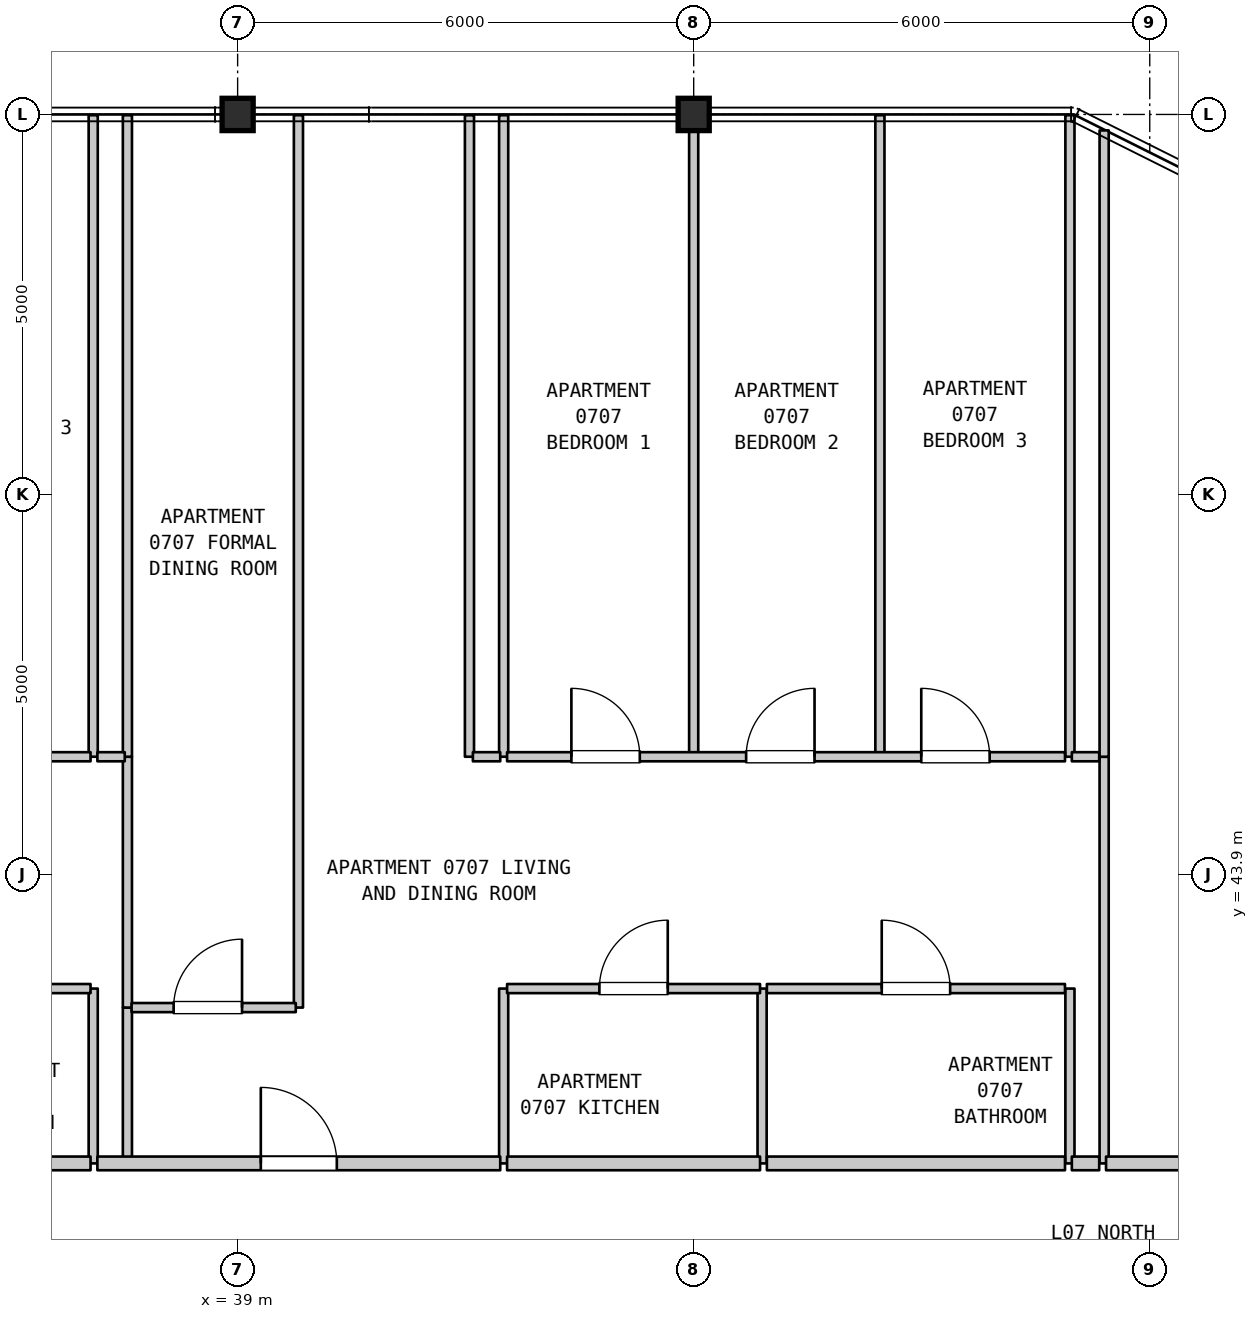
"""IFC4 building model, lengths in metres.
Left out: names, types, materials, properties, quantities, classifications, styles, units other than length and angle.
Written with IfcOpenShell. Run it as: python <this file> out.ifc"""

import sys

from ifc_helpers import new_model, si_unit, direction, frame, frame_2d, origin, origin_2d, place, context, subcontext, project, spatial, rectangle, i_section, extrude, element, fill, save


model = new_model("IFC4")
c1 = context("Model", 3, precision=1e-05, world=origin(), true_north=direction((0.0, 1.0)))
c2 = subcontext(c1, "Body", "Model", "MODEL_VIEW")
j1 = project(units=[si_unit("LENGTHUNIT", "METRE"), si_unit("PLANEANGLEUNIT", "RADIAN")], contexts=[c1])
p1 = place(None, origin())
s1 = spatial("IfcSite", under=j1, at=p1, CompositionType="ELEMENT")
p2 = place(p1, origin())
s2 = spatial("IfcBuilding", under=s1, at=p2, CompositionType="ELEMENT")
p3 = place(p2, frame((0.0, 0.0, 35.1)))
s3 = spatial("IfcBuildingStorey", under=s2, at=p3, CompositionType="ELEMENT", Elevation=35.1)
for number, where, z_axis, x_axis in (
    (1, (39.0, 53.9, 0.0), (0.0, 0.0, 1.0), (1.0, 0.0, 0.0)),
    (2, (45.0, 53.9, 0.0), (0.0, 0.0, 1.0), (1.0, 0.0, 0.0)),
):
    element("IfcColumn", number, at=place(p3, frame(where, z_axis=z_axis, x_axis=x_axis)), inside=s3, PredefinedType="COLUMN", context=c2, shape_type="SweptSolid", body=[
        extrude(i_section(OverallWidth=0.409, OverallDepth=0.425, WebThickness=0.032, FlangeThickness=0.052, FilletRadius=0.015, at=origin_2d()), origin(), (0.0, 0.0, 1.0), 3.7),
    ])
p4 = place(p3, frame((37.1, 40.1, 0.0), z_axis=(0.0, 0.0, 1.0), x_axis=(0.0, 1.0, 0.0)))
e3 = element("IfcWall", 3, at=p4, inside=s3, PredefinedType="PARTITIONING", context=c2, shape_type="SweptSolid", body=[
    extrude(rectangle(XDim=2.3, YDim=0.12, at=frame_2d((1.15, 0.0))), origin(), (0.0, 0.0, 1.0), 3.385),
])
p5 = place(p3, frame((37.1, 45.45, 0.0), z_axis=(0.0, 0.0, 1.0), x_axis=(0.0, 1.0, 0.0)))
e4 = element("IfcWall", 4, at=p5, inside=s3, PredefinedType="PARTITIONING", context=c2, shape_type="SweptSolid", body=[
    extrude(rectangle(XDim=8.44, YDim=0.12, at=frame_2d((4.22, 0.0))), origin(), (0.0, 0.0, 1.0), 3.385),
])
p6 = place(p3, frame((37.55, 40.1, 0.0), z_axis=(0.0, 0.0, 1.0), x_axis=(0.0, 1.0, 0.0)))
e5 = element("IfcWall", 5, at=p6, inside=s3, PredefinedType="PARTITIONING", context=c2, shape_type="SweptSolid", body=[
    extrude(rectangle(XDim=2.05, YDim=0.12, at=frame_2d((1.025, 0.0))), origin(), (0.0, 0.0, 1.0), 3.385),
])
p7 = place(p3, frame((37.55, 42.15, 0.0), z_axis=(0.0, 0.0, 1.0), x_axis=(0.0, 1.0, 0.0)))
e6 = element("IfcWall", 6, at=p7, inside=s3, PredefinedType="PARTITIONING", context=c2, shape_type="SweptSolid", body=[
    extrude(rectangle(XDim=3.3, YDim=0.12, at=frame_2d((1.65, 0.0))), origin(), (0.0, 0.0, 1.0), 3.385),
])
p8 = place(p3, frame((37.55, 45.45, 0.0), z_axis=(0.0, 0.0, 1.0), x_axis=(0.0, 1.0, 0.0)))
e7 = element("IfcWall", 7, at=p8, inside=s3, PredefinedType="PARTITIONING", context=c2, shape_type="SweptSolid", body=[
    extrude(rectangle(XDim=8.44, YDim=0.12, at=frame_2d((4.22, 0.0))), origin(), (0.0, 0.0, 1.0), 3.385),
])
p9 = place(p3, frame((39.8, 42.15, 0.0), z_axis=(0.0, 0.0, 1.0), x_axis=(0.0, 1.0, 0.0)))
e8 = element("IfcWall", 8, at=p9, inside=s3, PredefinedType="PARTITIONING", context=c2, shape_type="SweptSolid", body=[
    extrude(rectangle(XDim=11.74, YDim=0.12, at=frame_2d((5.87, 0.0))), origin(), (0.0, 0.0, 1.0), 3.385),
])
p10 = place(p3, frame((42.05, 45.45, 0.0), z_axis=(0.0, 0.0, 1.0), x_axis=(0.0, 1.0, 0.0)))
e9 = element("IfcWall", 9, at=p10, inside=s3, PredefinedType="PARTITIONING", context=c2, shape_type="SweptSolid", body=[
    extrude(rectangle(XDim=8.44, YDim=0.12, at=frame_2d((4.22, 0.0))), origin(), (0.0, 0.0, 1.0), 3.385),
])
p11 = place(p3, frame((42.5, 40.1, 0.0), z_axis=(0.0, 0.0, 1.0), x_axis=(0.0, 1.0, 0.0)))
e10 = element("IfcWall", 10, at=p11, inside=s3, PredefinedType="PARTITIONING", context=c2, shape_type="SweptSolid", body=[
    extrude(rectangle(XDim=2.3, YDim=0.12, at=frame_2d((1.15, 0.0))), origin(), (0.0, 0.0, 1.0), 3.385),
])
for number, where, z_axis, x_axis in (
    (11, (42.5, 45.45, 0.0), (0.0, 0.0, 1.0), (0.0, 1.0, 0.0)),
    (12, (45.0, 45.45, 0.0), (0.0, 0.0, 1.0), (0.0, 1.0, 0.0)),
):
    element("IfcWall", number, at=place(p3, frame(where, z_axis=z_axis, x_axis=x_axis)), inside=s3, PredefinedType="PARTITIONING", context=c2, shape_type="SweptSolid", body=[
        extrude(rectangle(XDim=8.44, YDim=0.12, at=frame_2d((4.22, 0.0))), origin(), (0.0, 0.0, 1.0), 3.385),
    ])
p12 = place(p3, frame((45.9, 40.1, 0.0), z_axis=(0.0, 0.0, 1.0), x_axis=(0.0, 1.0, 0.0)))
e13 = element("IfcWall", 13, at=p12, inside=s3, PredefinedType="PARTITIONING", context=c2, shape_type="SweptSolid", body=[
    extrude(rectangle(XDim=2.3, YDim=0.12, at=frame_2d((1.15, 0.0))), origin(), (0.0, 0.0, 1.0), 3.385),
])
p13 = place(p3, frame((47.45, 45.45, 0.0), z_axis=(0.0, 0.0, 1.0), x_axis=(0.0, 1.0, 0.0)))
e14 = element("IfcWall", 14, at=p13, inside=s3, PredefinedType="PARTITIONING", context=c2, shape_type="SweptSolid", body=[
    extrude(rectangle(XDim=8.44, YDim=0.12, at=frame_2d((4.22, 0.0))), origin(), (0.0, 0.0, 1.0), 3.385),
])
p14 = place(p3, frame((49.95, 40.1, 0.0), z_axis=(0.0, 0.0, 1.0), x_axis=(0.0, 1.0, 0.0)))
e15 = element("IfcWall", 15, at=p14, inside=s3, PredefinedType="PARTITIONING", context=c2, shape_type="SweptSolid", body=[
    extrude(rectangle(XDim=2.3, YDim=0.12, at=frame_2d((1.15, 0.0))), origin(), (0.0, 0.0, 1.0), 3.385),
])
p15 = place(p3, frame((49.95, 45.45, 0.0), z_axis=(0.0, 0.0, 1.0), x_axis=(0.0, 1.0, 0.0)))
e16 = element("IfcWall", 16, at=p15, inside=s3, PredefinedType="PARTITIONING", context=c2, shape_type="SweptSolid", body=[
    extrude(rectangle(XDim=8.44, YDim=0.12, at=frame_2d((4.22, 0.0))), origin(), (0.0, 0.0, 1.0), 3.385),
])
p16 = place(p3, frame((50.4, 40.1, 0.0), z_axis=(0.0, 0.0, 1.0), x_axis=(0.0, 1.0, 0.0)))
e17 = element("IfcWall", 17, at=p16, inside=s3, PredefinedType="PARTITIONING", context=c2, shape_type="SweptSolid", body=[
    extrude(rectangle(XDim=5.35, YDim=0.12, at=frame_2d((2.675, 0.0))), origin(), (0.0, 0.0, 1.0), 3.385),
])
p17 = place(p3, frame((50.4, 45.45, 0.0), z_axis=(0.0, 0.0, 1.0), x_axis=(0.0, 1.0, 0.0)))
e18 = element("IfcWall", 18, at=p17, inside=s3, PredefinedType="PARTITIONING", context=c2, shape_type="SweptSolid", body=[
    extrude(rectangle(XDim=8.24, YDim=0.12, at=frame_2d((4.12, 0.0))), origin(), (0.0, 0.0, 1.0), 3.385),
])
p18 = place(p3, frame((34.873, 40.1, 0.0), z_axis=(0.0, 0.0, 1.0), x_axis=(1.0, 0.0, 0.0)))
e19 = element("IfcWall", 19, at=p18, inside=s3, PredefinedType="STANDARD", context=c2, shape_type="SweptSolid", body=[
    extrude(rectangle(XDim=2.192, YDim=0.18, at=frame_2d((1.096, 0.0))), origin(), (0.0, 0.0, 1.0), 3.385),
])
p19 = place(p3, frame((37.155, 40.1, 0.0), z_axis=(0.0, 0.0, 1.0), x_axis=(1.0, 0.0, 0.0)))
e20 = element("IfcWall", 20, at=p19, inside=s3, PredefinedType="STANDARD", context=c2, shape_type="SweptSolid", body=[
    extrude(rectangle(XDim=5.3, YDim=0.18, at=frame_2d((2.65, 0.0))), origin(), (0.0, 0.0, 1.0), 3.385),
])
p20 = place(p19, frame((2.15, 0.0, 0.0)))
e21 = element("IfcOpeningElement", 21, at=p20, cuts=e20, PredefinedType="OPENING", context=c2, shape_type="SweptSolid", body=[
    extrude(rectangle(XDim=1.0, YDim=2.15, at=frame_2d((0.5, 1.075))), frame((0.0, 0.1, 0.0), z_axis=(0.0, -1.0, 0.0), x_axis=(1.0, 0.0, 0.0)), (0.0, 0.0, 1.0), 0.2),
])
p21 = place(p3, frame((42.545, 40.1, 0.0), z_axis=(0.0, 0.0, 1.0), x_axis=(1.0, 0.0, 0.0)))
e22 = element("IfcWall", 22, at=p21, inside=s3, PredefinedType="STANDARD", context=c2, shape_type="SweptSolid", body=[
    extrude(rectangle(XDim=3.328, YDim=0.18, at=frame_2d((1.664, 0.0))), origin(), (0.0, 0.0, 1.0), 3.385),
])
p22 = place(p3, frame((45.963, 40.1, 0.0), z_axis=(0.0, 0.0, 1.0), x_axis=(1.0, 0.0, 0.0)))
e23 = element("IfcWall", 23, at=p22, inside=s3, PredefinedType="STANDARD", context=c2, shape_type="SweptSolid", body=[
    extrude(rectangle(XDim=3.922, YDim=0.18, at=frame_2d((1.961, 0.0))), origin(), (0.0, 0.0, 1.0), 3.385),
])
p23 = place(p3, frame((49.975, 40.1, 0.0), z_axis=(0.0, 0.0, 1.0), x_axis=(1.0, 0.0, 0.0)))
e24 = element("IfcWall", 24, at=p23, inside=s3, PredefinedType="STANDARD", context=c2, shape_type="SweptSolid", body=[
    extrude(rectangle(XDim=0.36, YDim=0.18, at=frame_2d((0.18, 0.0))), origin(), (0.0, 0.0, 1.0), 3.385),
])
p24 = place(p3, frame((50.425, 40.1, 0.0), z_axis=(0.0, 0.0, 1.0), x_axis=(1.0, 0.0, 0.0)))
e25 = element("IfcWall", 25, at=p24, inside=s3, PredefinedType="STANDARD", context=c2, shape_type="SweptSolid", body=[
    extrude(rectangle(XDim=4.03, YDim=0.18, at=frame_2d((2.015, 0.0))), origin(), (0.0, 0.0, 1.0), 3.385),
])
p25 = place(p24, frame((1.515, 0.0, 0.0)))
e26 = element("IfcOpeningElement", 26, at=p25, cuts=e25, PredefinedType="OPENING", context=c2, shape_type="SweptSolid", body=[
    extrude(rectangle(XDim=1.0, YDim=2.15, at=frame_2d((0.5, 1.075))), frame((0.0, 0.1, 0.0), z_axis=(0.0, -1.0, 0.0), x_axis=(1.0, 0.0, 0.0)), (0.0, 0.0, 1.0), 0.2),
])
p26 = place(p3, frame((37.605, 42.15, 0.0), z_axis=(0.0, 0.0, 1.0), x_axis=(1.0, 0.0, 0.0)))
e27 = element("IfcWall", 27, at=p26, inside=s3, PredefinedType="PARTITIONING", context=c2, shape_type="SweptSolid", body=[
    extrude(rectangle(XDim=2.16, YDim=0.12, at=frame_2d((1.08, 0.0))), origin(), (0.0, 0.0, 1.0), 3.385),
])
p27 = place(p26, frame((0.553, 0.0, 0.0)))
e28 = element("IfcOpeningElement", 28, at=p27, cuts=e27, PredefinedType="OPENING", context=c2, shape_type="SweptSolid", body=[
    extrude(rectangle(XDim=0.9, YDim=2.15, at=frame_2d((0.45, 1.075))), frame((0.0, 0.07, 0.0), z_axis=(0.0, -1.0, 0.0), x_axis=(1.0, 0.0, 0.0)), (0.0, 0.0, 1.0), 0.14),
])
p28 = place(p3, frame((34.873, 42.4, 0.0), z_axis=(0.0, 0.0, 1.0), x_axis=(1.0, 0.0, 0.0)))
e29 = element("IfcWall", 29, at=p28, inside=s3, PredefinedType="PARTITIONING", context=c2, shape_type="SweptSolid", body=[
    extrude(rectangle(XDim=2.192, YDim=0.12, at=frame_2d((1.096, 0.0))), origin(), (0.0, 0.0, 1.0), 3.385),
])
p29 = place(p28, frame((0.646, 0.0, 0.0)))
e30 = element("IfcOpeningElement", 30, at=p29, cuts=e29, PredefinedType="OPENING", context=c2, shape_type="SweptSolid", body=[
    extrude(rectangle(XDim=0.9, YDim=2.1, at=frame_2d((0.45, 1.05))), frame((0.0, 0.07, 0.0), z_axis=(0.0, -1.0, 0.0), x_axis=(1.0, 0.0, 0.0)), (0.0, 0.0, 1.0), 0.14),
])
p30 = place(p3, frame((42.545, 42.4, 0.0), z_axis=(0.0, 0.0, 1.0), x_axis=(1.0, 0.0, 0.0)))
e31 = element("IfcWall", 31, at=p30, inside=s3, PredefinedType="PARTITIONING", context=c2, shape_type="SweptSolid", body=[
    extrude(rectangle(XDim=3.328, YDim=0.12, at=frame_2d((1.664, 0.0))), origin(), (0.0, 0.0, 1.0), 3.385),
])
p31 = place(p30, frame((1.214, 0.0, 0.0)))
e32 = element("IfcOpeningElement", 32, at=p31, cuts=e31, PredefinedType="OPENING", context=c2, shape_type="SweptSolid", body=[
    extrude(rectangle(XDim=0.9, YDim=2.15, at=frame_2d((0.45, 1.075))), frame((0.0, 0.07, 0.0), z_axis=(0.0, -1.0, 0.0), x_axis=(1.0, 0.0, 0.0)), (0.0, 0.0, 1.0), 0.14),
])
p32 = place(p3, frame((45.963, 42.4, 0.0), z_axis=(0.0, 0.0, 1.0), x_axis=(1.0, 0.0, 0.0)))
e33 = element("IfcWall", 33, at=p32, inside=s3, PredefinedType="PARTITIONING", context=c2, shape_type="SweptSolid", body=[
    extrude(rectangle(XDim=3.922, YDim=0.12, at=frame_2d((1.961, 0.0))), origin(), (0.0, 0.0, 1.0), 3.385),
])
p33 = place(p32, frame((1.511, 0.0, 0.0)))
e34 = element("IfcOpeningElement", 34, at=p33, cuts=e33, PredefinedType="OPENING", context=c2, shape_type="SweptSolid", body=[
    extrude(rectangle(XDim=0.9, YDim=2.1, at=frame_2d((0.45, 1.05))), frame((0.0, 0.07, 0.0), z_axis=(0.0, -1.0, 0.0), x_axis=(1.0, 0.0, 0.0)), (0.0, 0.0, 1.0), 0.14),
])
p34 = place(p3, frame((29.005, 45.45, 0.0), z_axis=(0.0, 0.0, 1.0), x_axis=(1.0, 0.0, 0.0)))
e35 = element("IfcWall", 35, at=p34, inside=s3, PredefinedType="PARTITIONING", context=c2, shape_type="SweptSolid", body=[
    extrude(rectangle(XDim=8.06, YDim=0.12, at=frame_2d((4.03, 0.0))), origin(), (0.0, 0.0, 1.0), 3.385),
])
p35 = place(p34, frame((0.968, 0.0, 0.0)))
e36 = element("IfcOpeningElement", 36, at=p35, cuts=e35, PredefinedType="OPENING", context=c2, shape_type="SweptSolid", body=[
    extrude(rectangle(XDim=0.9, YDim=2.15, at=frame_2d((0.45, 1.075))), frame((0.0, 0.07, 0.0), z_axis=(0.0, -1.0, 0.0), x_axis=(1.0, 0.0, 0.0)), (0.0, 0.0, 1.0), 0.14),
])
p36 = place(p34, frame((3.507, 0.0, 0.0)))
e37 = element("IfcOpeningElement", 37, at=p36, cuts=e35, PredefinedType="OPENING", context=c2, shape_type="SweptSolid", body=[
    extrude(rectangle(XDim=0.9, YDim=2.15, at=frame_2d((0.45, 1.075))), frame((0.0, 0.07, 0.0), z_axis=(0.0, -1.0, 0.0), x_axis=(1.0, 0.0, 0.0)), (0.0, 0.0, 1.0), 0.14),
])
p37 = place(p34, frame((6.051, 0.0, 0.0)))
e38 = element("IfcOpeningElement", 38, at=p37, cuts=e35, PredefinedType="OPENING", context=c2, shape_type="SweptSolid", body=[
    extrude(rectangle(XDim=0.9, YDim=2.15, at=frame_2d((0.45, 1.075))), frame((0.0, 0.07, 0.0), z_axis=(0.0, -1.0, 0.0), x_axis=(1.0, 0.0, 0.0)), (0.0, 0.0, 1.0), 0.14),
])
p38 = place(p3, frame((37.155, 45.45, 0.0), z_axis=(0.0, 0.0, 1.0), x_axis=(1.0, 0.0, 0.0)))
e39 = element("IfcWall", 39, at=p38, inside=s3, PredefinedType="PARTITIONING", context=c2, shape_type="SweptSolid", body=[
    extrude(rectangle(XDim=0.36, YDim=0.12, at=frame_2d((0.18, 0.0))), origin(), (0.0, 0.0, 1.0), 3.385),
])
p39 = place(p3, frame((42.095, 45.45, 0.0), z_axis=(0.0, 0.0, 1.0), x_axis=(1.0, 0.0, 0.0)))
e40 = element("IfcWall", 40, at=p39, inside=s3, PredefinedType="PARTITIONING", context=c2, shape_type="SweptSolid", body=[
    extrude(rectangle(XDim=0.36, YDim=0.12, at=frame_2d((0.18, 0.0))), origin(), (0.0, 0.0, 1.0), 3.385),
])
p40 = place(p3, frame((42.545, 45.45, 0.0), z_axis=(0.0, 0.0, 1.0), x_axis=(1.0, 0.0, 0.0)))
e41 = element("IfcWall", 41, at=p40, inside=s3, PredefinedType="PARTITIONING", context=c2, shape_type="SweptSolid", body=[
    extrude(rectangle(XDim=7.34, YDim=0.12, at=frame_2d((3.67, 0.0))), origin(), (0.0, 0.0, 1.0), 3.385),
])
p41 = place(p40, frame((0.846, 0.0, 0.0)))
e42 = element("IfcOpeningElement", 42, at=p41, cuts=e41, PredefinedType="OPENING", context=c2, shape_type="SweptSolid", body=[
    extrude(rectangle(XDim=0.9, YDim=2.15, at=frame_2d((0.45, 1.075))), frame((0.0, 0.07, 0.0), z_axis=(0.0, -1.0, 0.0), x_axis=(1.0, 0.0, 0.0)), (0.0, 0.0, 1.0), 0.14),
])
p42 = place(p40, frame((3.145, 0.0, 0.0)))
e43 = element("IfcOpeningElement", 43, at=p42, cuts=e41, PredefinedType="OPENING", context=c2, shape_type="SweptSolid", body=[
    extrude(rectangle(XDim=0.9, YDim=2.15, at=frame_2d((0.45, 1.075))), frame((0.0, 0.07, 0.0), z_axis=(0.0, -1.0, 0.0), x_axis=(1.0, 0.0, 0.0)), (0.0, 0.0, 1.0), 0.14),
])
p43 = place(p40, frame((5.449, 0.0, 0.0)))
e44 = element("IfcOpeningElement", 44, at=p43, cuts=e41, PredefinedType="OPENING", context=c2, shape_type="SweptSolid", body=[
    extrude(rectangle(XDim=0.9, YDim=2.15, at=frame_2d((0.45, 1.075))), frame((0.0, 0.07, 0.0), z_axis=(0.0, -1.0, 0.0), x_axis=(1.0, 0.0, 0.0)), (0.0, 0.0, 1.0), 0.14),
])
p44 = place(p3, frame((49.975, 45.45, 0.0), z_axis=(0.0, 0.0, 1.0), x_axis=(1.0, 0.0, 0.0)))
e45 = element("IfcWall", 45, at=p44, inside=s3, PredefinedType="PARTITIONING", context=c2, shape_type="SweptSolid", body=[
    extrude(rectangle(XDim=0.36, YDim=0.12, at=frame_2d((0.18, 0.0))), origin(), (0.0, 0.0, 1.0), 3.385),
])
p45 = place(p20, origin())
e46 = element("IfcDoor", 46, at=p45, inside=s3, OperationType="SINGLE_SWING_LEFT", PredefinedType="DOOR", context=c2, shape_type="SweptSolid", body=[
    extrude(rectangle(XDim=1.0, YDim=2.15, at=frame_2d((0.5, 1.075))), frame((0.0, 0.025, 0.0), z_axis=(0.0, -1.0, 0.0), x_axis=(1.0, 0.0, 0.0)), (0.0, 0.0, 1.0), 0.05),
])
fill(e21, e46)
p46 = place(p27, origin())
e47 = element("IfcDoor", 47, at=p46, inside=s3, OperationType="SINGLE_SWING_RIGHT", PredefinedType="DOOR", context=c2, shape_type="SweptSolid", body=[
    extrude(rectangle(XDim=0.9, YDim=2.15, at=frame_2d((0.45, 1.075))), frame((0.0, 0.025, 0.0), z_axis=(0.0, -1.0, 0.0), x_axis=(1.0, 0.0, 0.0)), (0.0, 0.0, 1.0), 0.05),
])
fill(e28, e47)
p47 = place(p31, origin())
e48 = element("IfcDoor", 48, at=p47, inside=s3, OperationType="SINGLE_SWING_RIGHT", PredefinedType="DOOR", context=c2, shape_type="SweptSolid", body=[
    extrude(rectangle(XDim=0.9, YDim=2.15, at=frame_2d((0.45, 1.075))), frame((0.0, 0.025, 0.0), z_axis=(0.0, -1.0, 0.0), x_axis=(1.0, 0.0, 0.0)), (0.0, 0.0, 1.0), 0.05),
])
fill(e32, e48)
p48 = place(p33, origin())
e49 = element("IfcDoor", 49, at=p48, inside=s3, OperationType="SINGLE_SWING_LEFT", PredefinedType="DOOR", context=c2, shape_type="SweptSolid", body=[
    extrude(rectangle(XDim=0.9, YDim=2.1, at=frame_2d((0.45, 1.05))), frame((0.0, 0.025, 0.0), z_axis=(0.0, -1.0, 0.0), x_axis=(1.0, 0.0, 0.0)), (0.0, 0.0, 1.0), 0.05),
])
fill(e34, e49)
p49 = place(p41, origin())
e50 = element("IfcDoor", 50, at=p49, inside=s3, OperationType="SINGLE_SWING_LEFT", PredefinedType="DOOR", context=c2, shape_type="SweptSolid", body=[
    extrude(rectangle(XDim=0.9, YDim=2.15, at=frame_2d((0.45, 1.075))), frame((0.0, 0.025, 0.0), z_axis=(0.0, -1.0, 0.0), x_axis=(1.0, 0.0, 0.0)), (0.0, 0.0, 1.0), 0.05),
])
fill(e42, e50)
p50 = place(p42, origin())
e51 = element("IfcDoor", 51, at=p50, inside=s3, OperationType="SINGLE_SWING_RIGHT", PredefinedType="DOOR", context=c2, shape_type="SweptSolid", body=[
    extrude(rectangle(XDim=0.9, YDim=2.15, at=frame_2d((0.45, 1.075))), frame((0.0, 0.025, 0.0), z_axis=(0.0, -1.0, 0.0), x_axis=(1.0, 0.0, 0.0)), (0.0, 0.0, 1.0), 0.05),
])
fill(e43, e51)
p51 = place(p43, origin())
e52 = element("IfcDoor", 52, at=p51, inside=s3, OperationType="SINGLE_SWING_LEFT", PredefinedType="DOOR", context=c2, shape_type="SweptSolid", body=[
    extrude(rectangle(XDim=0.9, YDim=2.15, at=frame_2d((0.45, 1.075))), frame((0.0, 0.025, 0.0), z_axis=(0.0, -1.0, 0.0), x_axis=(1.0, 0.0, 0.0)), (0.0, 0.0, 1.0), 0.05),
])
fill(e44, e52)
save(model, sys.argv[1])
